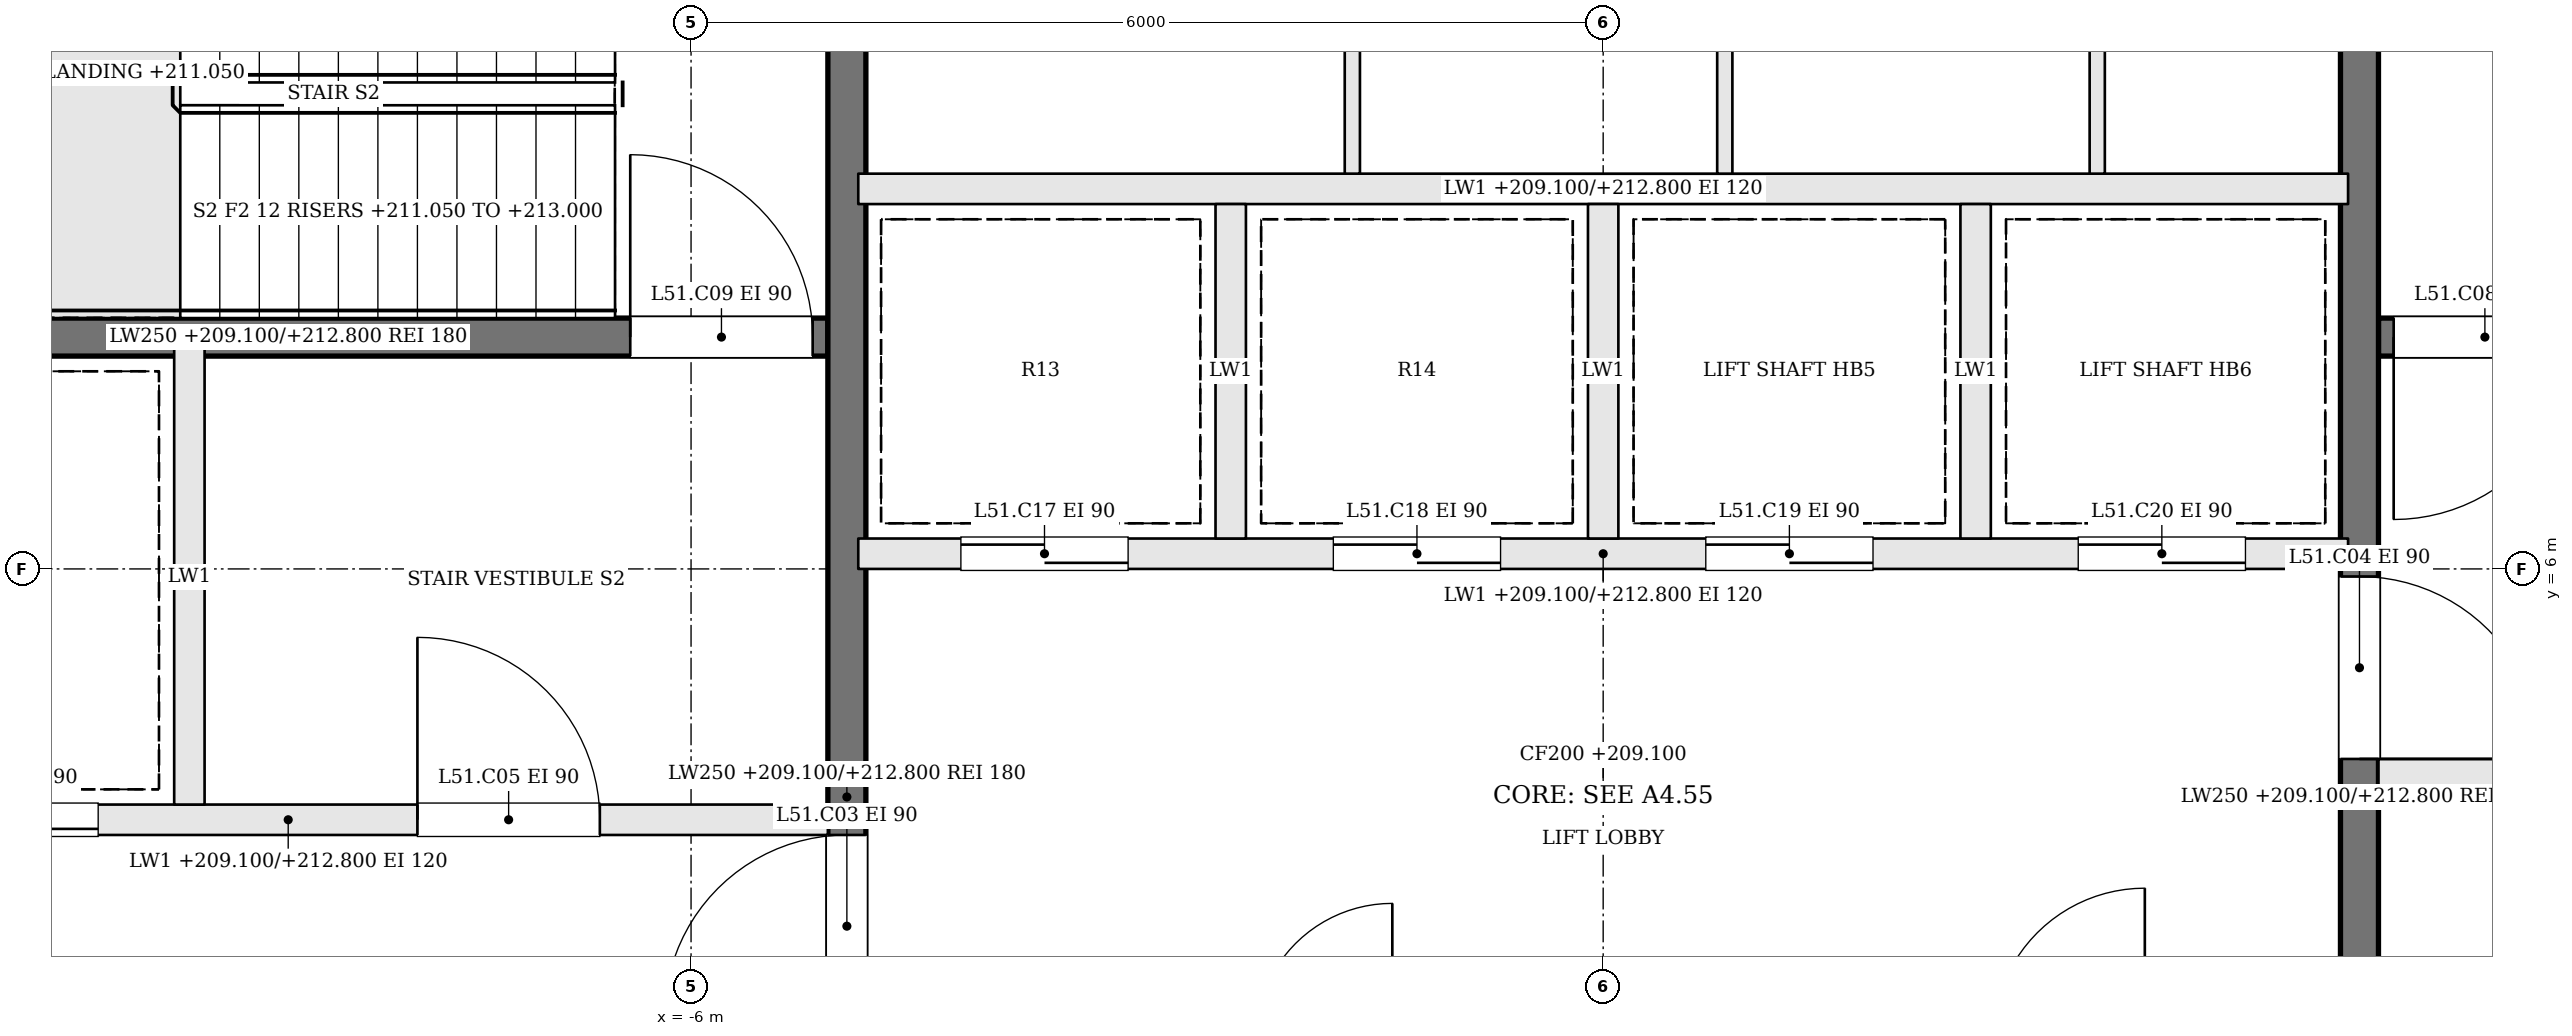
"""IFC4 building model, lengths in metres.
Left out: names, types, materials, properties, quantities, classifications, styles, units other than length and angle.
Written with IfcOpenShell. Run it as: python <this file> out.ifc"""

import sys

from ifc_helpers import new_model, si_unit, direction, frame, frame_2d, origin, place, context, subcontext, project, spatial, rectangle, extrude, element, fill, save


model = new_model("IFC4")
c1 = context("Model", 3, precision=1e-05, world=origin(), true_north=direction((0.0, 1.0)))
c2 = subcontext(c1, "Body", "Model", "MODEL_VIEW")
j1 = project(units=[si_unit("LENGTHUNIT", "METRE"), si_unit("PLANEANGLEUNIT", "RADIAN")], contexts=[c1])
p1 = place(None, origin())
s1 = spatial("IfcSite", under=j1, at=p1, CompositionType="ELEMENT")
p2 = place(p1, origin())
s2 = spatial("IfcBuilding", under=s1, at=p2, CompositionType="ELEMENT")
p3 = place(p2, frame((0.0, 0.0, 209.1)))
s3 = spatial("IfcBuildingStorey", under=s2, at=p3, CompositionType="ELEMENT", Elevation=209.1)
p4 = place(p3, frame((12.2, 7.525, 0.0), z_axis=(0.0, 0.0, 1.0), x_axis=(-1.0, 0.0, 0.0)))
e1 = element("IfcWall", 1, at=p4, inside=s3, PredefinedType="SOLIDWALL", context=c2, shape_type="SweptSolid", body=[
    extrude(rectangle(XDim=7.1, YDim=0.25, at=frame_2d((3.55, 0.0))), origin(), (0.0, 0.0, 1.0), 3.7),
])
p5 = place(p4, frame((5.8, 0.0, 0.0)))
e2 = element("IfcOpeningElement", 2, at=p5, cuts=e1, PredefinedType="OPENING", context=c2, shape_type="SweptSolid", body=[
    extrude(rectangle(XDim=1.2, YDim=2.1, at=frame_2d((0.6, 1.05))), frame((0.0, 0.135, 0.0), z_axis=(0.0, -1.0, 0.0), x_axis=(1.0, 0.0, 0.0)), (0.0, 0.0, 1.0), 0.27),
])
p6 = place(p3, frame((-12.2, 4.35, 0.0), z_axis=(0.0, 0.0, 1.0), x_axis=(1.0, 0.0, 0.0)))
e3 = element("IfcWall", 3, at=p6, inside=s3, PredefinedType="SOLIDWALL", context=c2, shape_type="SweptSolid", body=[
    extrude(rectangle(XDim=7.1, YDim=0.2, at=frame_2d((3.55, 0.0))), origin(), (0.0, 0.0, 1.0), 3.7),
])
p7 = place(p6, frame((4.4, 0.0, 0.0)))
e4 = element("IfcOpeningElement", 4, at=p7, cuts=e3, PredefinedType="OPENING", context=c2, shape_type="SweptSolid", body=[
    extrude(rectangle(XDim=1.2, YDim=2.1, at=frame_2d((0.6, 1.05))), frame((0.0, 0.11, 0.0), z_axis=(0.0, -1.0, 0.0), x_axis=(1.0, 0.0, 0.0)), (0.0, 0.0, 1.0), 0.22),
])
p8 = place(p6, frame((1.1, 0.0, 0.0)))
e5 = element("IfcOpeningElement", 5, at=p8, cuts=e3, PredefinedType="OPENING", context=c2, shape_type="SweptSolid", body=[
    extrude(rectangle(XDim=1.2, YDim=2.1, at=frame_2d((0.6, 1.05))), frame((0.0, 0.11, 0.0), z_axis=(0.0, -1.0, 0.0), x_axis=(1.0, 0.0, 0.0)), (0.0, 0.0, 1.0), 0.22),
])
p9 = place(p3, frame((12.2, 4.65, 0.0), z_axis=(0.0, 0.0, 1.0), x_axis=(-1.0, 0.0, 0.0)))
e6 = element("IfcWall", 6, at=p9, inside=s3, PredefinedType="SOLIDWALL", context=c2, shape_type="SweptSolid", body=[
    extrude(rectangle(XDim=7.1, YDim=0.2, at=frame_2d((3.55, 0.0))), origin(), (0.0, 0.0, 1.0), 3.7),
])
p10 = place(p9, frame((4.4, 0.0, 0.0)))
e7 = element("IfcOpeningElement", 7, at=p10, cuts=e6, PredefinedType="OPENING", context=c2, shape_type="SweptSolid", body=[
    extrude(rectangle(XDim=1.2, YDim=2.1, at=frame_2d((0.6, 1.05))), frame((0.0, 0.11, 0.0), z_axis=(0.0, -1.0, 0.0), x_axis=(1.0, 0.0, 0.0)), (0.0, 0.0, 1.0), 0.22),
])
p11 = place(p9, frame((1.1, 0.0, 0.0)))
e8 = element("IfcOpeningElement", 8, at=p11, cuts=e6, PredefinedType="OPENING", context=c2, shape_type="SweptSolid", body=[
    extrude(rectangle(XDim=1.2, YDim=2.1, at=frame_2d((0.6, 1.05))), frame((0.0, 0.11, 0.0), z_axis=(0.0, -1.0, 0.0), x_axis=(1.0, 0.0, 0.0)), (0.0, 0.0, 1.0), 0.22),
])
p12 = place(p3, frame((-12.2, 7.525, 0.0), z_axis=(0.0, 0.0, 1.0), x_axis=(1.0, 0.0, 0.0)))
e9 = element("IfcWall", 9, at=p12, inside=s3, PredefinedType="SOLIDWALL", context=c2, shape_type="SweptSolid", body=[
    extrude(rectangle(XDim=7.1, YDim=0.25, at=frame_2d((3.55, 0.0))), origin(), (0.0, 0.0, 1.0), 3.7),
])
p13 = place(p12, frame((5.8, 0.0, 0.0)))
e10 = element("IfcOpeningElement", 10, at=p13, cuts=e9, PredefinedType="OPENING", context=c2, shape_type="SweptSolid", body=[
    extrude(rectangle(XDim=1.2, YDim=2.1, at=frame_2d((0.6, 1.05))), frame((0.0, 0.135, 0.0), z_axis=(0.0, -1.0, 0.0), x_axis=(1.0, 0.0, 0.0)), (0.0, 0.0, 1.0), 0.27),
])
p14 = place(p3, frame((-9.3, 4.45, 0.0), z_axis=(0.0, 0.0, 1.0), x_axis=(0.0, 1.0, 0.0)))
e11 = element("IfcWall", 11, at=p14, inside=s3, PredefinedType="SOLIDWALL", context=c2, shape_type="SweptSolid", body=[
    extrude(rectangle(XDim=3.0, YDim=0.2, at=frame_2d((1.5, 0.0))), origin(), (0.0, 0.0, 1.0), 3.7),
])
p15 = place(p3, frame((-4.975, -2.2, 0.0), z_axis=(0.0, 0.0, 1.0), x_axis=(0.0, 1.0, 0.0)))
e12 = element("IfcWall", 12, at=p15, inside=s3, PredefinedType="SOLIDWALL", context=c2, shape_type="SweptSolid", body=[
    extrude(rectangle(XDim=13.4, YDim=0.25, at=frame_2d((6.7, 0.0))), origin(), (0.0, 0.0, 1.0), 3.7),
])
p16 = place(p15, frame((5.25, 0.0, 0.0)))
e13 = element("IfcOpeningElement", 13, at=p16, cuts=e12, PredefinedType="OPENING", context=c2, shape_type="SweptSolid", body=[
    extrude(rectangle(XDim=1.2, YDim=2.1, at=frame_2d((0.6, 1.05))), frame((0.0, 0.135, 0.0), z_axis=(0.0, -1.0, 0.0), x_axis=(1.0, 0.0, 0.0)), (0.0, 0.0, 1.0), 0.27),
])
p17 = place(p3, frame((4.975, 11.2, 0.0), z_axis=(0.0, 0.0, 1.0), x_axis=(0.0, -1.0, 0.0)))
e14 = element("IfcWall", 14, at=p17, inside=s3, PredefinedType="SOLIDWALL", context=c2, shape_type="SweptSolid", body=[
    extrude(rectangle(XDim=13.4, YDim=0.25, at=frame_2d((6.7, 0.0))), origin(), (0.0, 0.0, 1.0), 3.7),
])
p18 = place(p17, frame((5.25, 0.0, 0.0)))
e15 = element("IfcOpeningElement", 15, at=p18, cuts=e14, PredefinedType="OPENING", context=c2, shape_type="SweptSolid", body=[
    extrude(rectangle(XDim=1.2, YDim=2.1, at=frame_2d((0.6, 1.05))), frame((0.0, 0.135, 0.0), z_axis=(0.0, -1.0, 0.0), x_axis=(1.0, 0.0, 0.0)), (0.0, 0.0, 1.0), 0.27),
])
p19 = place(p3, frame((-4.9, 6.1, 0.0), z_axis=(0.0, 0.0, 1.0), x_axis=(1.0, 0.0, 0.0)))
e16 = element("IfcWall", 16, at=p19, inside=s3, PredefinedType="SOLIDWALL", context=c2, shape_type="SweptSolid", body=[
    extrude(rectangle(XDim=9.8, YDim=0.2, at=frame_2d((4.9, 0.0))), origin(), (0.0, 0.0, 1.0), 3.7),
])
p20 = place(p19, frame((0.675, 0.0, 0.0)))
e17 = element("IfcOpeningElement", 17, at=p20, cuts=e16, PredefinedType="OPENING", context=c2, shape_type="SweptSolid", body=[
    extrude(rectangle(XDim=1.1, YDim=2.1, at=frame_2d((0.55, 1.05))), frame((0.0, 0.11, 0.0), z_axis=(0.0, -1.0, 0.0), x_axis=(1.0, 0.0, 0.0)), (0.0, 0.0, 1.0), 0.22),
])
p21 = place(p19, frame((3.125, 0.0, 0.0)))
e18 = element("IfcOpeningElement", 18, at=p21, cuts=e16, PredefinedType="OPENING", context=c2, shape_type="SweptSolid", body=[
    extrude(rectangle(XDim=1.1, YDim=2.1, at=frame_2d((0.55, 1.05))), frame((0.0, 0.11, 0.0), z_axis=(0.0, -1.0, 0.0), x_axis=(1.0, 0.0, 0.0)), (0.0, 0.0, 1.0), 0.22),
])
p22 = place(p19, frame((5.575, 0.0, 0.0)))
e19 = element("IfcOpeningElement", 19, at=p22, cuts=e16, PredefinedType="OPENING", context=c2, shape_type="SweptSolid", body=[
    extrude(rectangle(XDim=1.1, YDim=2.1, at=frame_2d((0.55, 1.05))), frame((0.0, 0.11, 0.0), z_axis=(0.0, -1.0, 0.0), x_axis=(1.0, 0.0, 0.0)), (0.0, 0.0, 1.0), 0.22),
])
p23 = place(p19, frame((8.025, 0.0, 0.0)))
e20 = element("IfcOpeningElement", 20, at=p23, cuts=e16, PredefinedType="OPENING", context=c2, shape_type="SweptSolid", body=[
    extrude(rectangle(XDim=1.1, YDim=2.1, at=frame_2d((0.55, 1.05))), frame((0.0, 0.11, 0.0), z_axis=(0.0, -1.0, 0.0), x_axis=(1.0, 0.0, 0.0)), (0.0, 0.0, 1.0), 0.22),
])
p24 = place(p3, frame((-4.9, 8.5, 0.0), z_axis=(0.0, 0.0, 1.0), x_axis=(1.0, 0.0, 0.0)))
e21 = element("IfcWall", 21, at=p24, inside=s3, PredefinedType="SOLIDWALL", context=c2, shape_type="SweptSolid", body=[
    extrude(rectangle(XDim=9.8, YDim=0.2, at=frame_2d((4.9, 0.0))), origin(), (0.0, 0.0, 1.0), 3.7),
])
for number, where, z_axis, x_axis in (
    (22, (-2.45, 6.2, 0.0), (0.0, 0.0, 1.0), (0.0, 1.0, 0.0)),
    (23, (0.0, 6.2, 0.0), (0.0, 0.0, 1.0), (0.0, 1.0, 0.0)),
    (24, (2.45, 6.2, 0.0), (0.0, 0.0, 1.0), (0.0, 1.0, 0.0)),
):
    element("IfcWall", number, at=place(p3, frame(where, z_axis=z_axis, x_axis=x_axis)), inside=s3, PredefinedType="SOLIDWALL", context=c2, shape_type="SweptSolid", body=[
        extrude(rectangle(XDim=2.2, YDim=0.2, at=frame_2d((1.1, 0.0))), origin(), (0.0, 0.0, 1.0), 3.7),
    ])
for number, where, z_axis, x_axis in (
    (25, (-1.65, 8.6, 0.0), (0.0, 0.0, 1.0), (0.0, 1.0, 0.0)),
    (26, (0.8, 8.6, 0.0), (0.0, 0.0, 1.0), (0.0, 1.0, 0.0)),
    (27, (3.25, 8.6, 0.0), (0.0, 0.0, 1.0), (0.0, 1.0, 0.0)),
):
    element("IfcWall", number, at=place(p3, frame(where, z_axis=z_axis, x_axis=x_axis)), inside=s3, PredefinedType="PARTITIONING", context=c2, shape_type="SweptSolid", body=[
        extrude(rectangle(XDim=2.6, YDim=0.1, at=frame_2d((1.3, 0.0))), origin(), (0.0, 0.0, 1.0), 3.7),
    ])
p25 = place(p16, origin())
e28 = element("IfcDoor", 28, at=p25, inside=s3, OperationType="SINGLE_SWING_LEFT", PredefinedType="DOOR", context=c2, shape_type="SweptSolid", body=[
    extrude(rectangle(XDim=1.2, YDim=2.1, at=frame_2d((0.6, 1.05))), frame((0.0, 0.025, 0.0), z_axis=(0.0, -1.0, 0.0), x_axis=(1.0, 0.0, 0.0)), (0.0, 0.0, 1.0), 0.05),
])
fill(e13, e28)
p26 = place(p18, origin())
e29 = element("IfcDoor", 29, at=p26, inside=s3, OperationType="SINGLE_SWING_RIGHT", PredefinedType="DOOR", context=c2, shape_type="SweptSolid", body=[
    extrude(rectangle(XDim=1.2, YDim=2.1, at=frame_2d((0.6, 1.05))), frame((0.0, 0.025, 0.0), z_axis=(0.0, -1.0, 0.0), x_axis=(1.0, 0.0, 0.0)), (0.0, 0.0, 1.0), 0.05),
])
fill(e15, e29)
p27 = place(p7, origin())
e30 = element("IfcDoor", 30, at=p27, inside=s3, OperationType="SINGLE_SWING_LEFT", PredefinedType="DOOR", context=c2, shape_type="SweptSolid", body=[
    extrude(rectangle(XDim=1.2, YDim=2.1, at=frame_2d((0.6, 1.05))), frame((0.0, 0.025, 0.0), z_axis=(0.0, -1.0, 0.0), x_axis=(1.0, 0.0, 0.0)), (0.0, 0.0, 1.0), 0.05),
])
fill(e4, e30)
p28 = place(p5, origin())
e31 = element("IfcDoor", 31, at=p28, inside=s3, OperationType="SINGLE_SWING_RIGHT", PredefinedType="DOOR", context=c2, shape_type="SweptSolid", body=[
    extrude(rectangle(XDim=1.2, YDim=2.1, at=frame_2d((0.6, 1.05))), frame((0.0, 0.025, 0.0), z_axis=(0.0, -1.0, 0.0), x_axis=(1.0, 0.0, 0.0)), (0.0, 0.0, 1.0), 0.05),
])
fill(e2, e31)
p29 = place(p13, origin())
e32 = element("IfcDoor", 32, at=p29, inside=s3, OperationType="SINGLE_SWING_LEFT", PredefinedType="DOOR", context=c2, shape_type="SweptSolid", body=[
    extrude(rectangle(XDim=1.2, YDim=2.1, at=frame_2d((0.6, 1.05))), frame((0.0, 0.025, 0.0), z_axis=(0.0, -1.0, 0.0), x_axis=(1.0, 0.0, 0.0)), (0.0, 0.0, 1.0), 0.05),
])
fill(e10, e32)
p30 = place(p8, origin())
e33 = element("IfcDoor", 33, at=p30, inside=s3, OperationType="SLIDING_TO_RIGHT", PredefinedType="DOOR", context=c2, shape_type="SweptSolid", body=[
    extrude(rectangle(XDim=1.2, YDim=2.1, at=frame_2d((0.6, 1.05))), frame((0.0, 0.025, 0.0), z_axis=(0.0, -1.0, 0.0), x_axis=(1.0, 0.0, 0.0)), (0.0, 0.0, 1.0), 0.05),
])
fill(e5, e33)
p31 = place(p20, origin())
e34 = element("IfcDoor", 34, at=p31, inside=s3, OperationType="SLIDING_TO_RIGHT", PredefinedType="DOOR", context=c2, shape_type="SweptSolid", body=[
    extrude(rectangle(XDim=1.1, YDim=2.1, at=frame_2d((0.55, 1.05))), frame((0.0, 0.025, 0.0), z_axis=(0.0, -1.0, 0.0), x_axis=(1.0, 0.0, 0.0)), (0.0, 0.0, 1.0), 0.05),
])
fill(e17, e34)
p32 = place(p21, origin())
e35 = element("IfcDoor", 35, at=p32, inside=s3, OperationType="SLIDING_TO_LEFT", PredefinedType="DOOR", context=c2, shape_type="SweptSolid", body=[
    extrude(rectangle(XDim=1.1, YDim=2.1, at=frame_2d((0.55, 1.05))), frame((0.0, 0.025, 0.0), z_axis=(0.0, -1.0, 0.0), x_axis=(1.0, 0.0, 0.0)), (0.0, 0.0, 1.0), 0.05),
])
fill(e18, e35)
p33 = place(p22, origin())
e36 = element("IfcDoor", 36, at=p33, inside=s3, OperationType="SLIDING_TO_RIGHT", PredefinedType="DOOR", context=c2, shape_type="SweptSolid", body=[
    extrude(rectangle(XDim=1.1, YDim=2.1, at=frame_2d((0.55, 1.05))), frame((0.0, 0.025, 0.0), z_axis=(0.0, -1.0, 0.0), x_axis=(1.0, 0.0, 0.0)), (0.0, 0.0, 1.0), 0.05),
])
fill(e19, e36)
p34 = place(p23, origin())
e37 = element("IfcDoor", 37, at=p34, inside=s3, OperationType="SLIDING_TO_LEFT", PredefinedType="DOOR", context=c2, shape_type="SweptSolid", body=[
    extrude(rectangle(XDim=1.1, YDim=2.1, at=frame_2d((0.55, 1.05))), frame((0.0, 0.025, 0.0), z_axis=(0.0, -1.0, 0.0), x_axis=(1.0, 0.0, 0.0)), (0.0, 0.0, 1.0), 0.05),
])
fill(e20, e37)
save(model, sys.argv[1])
